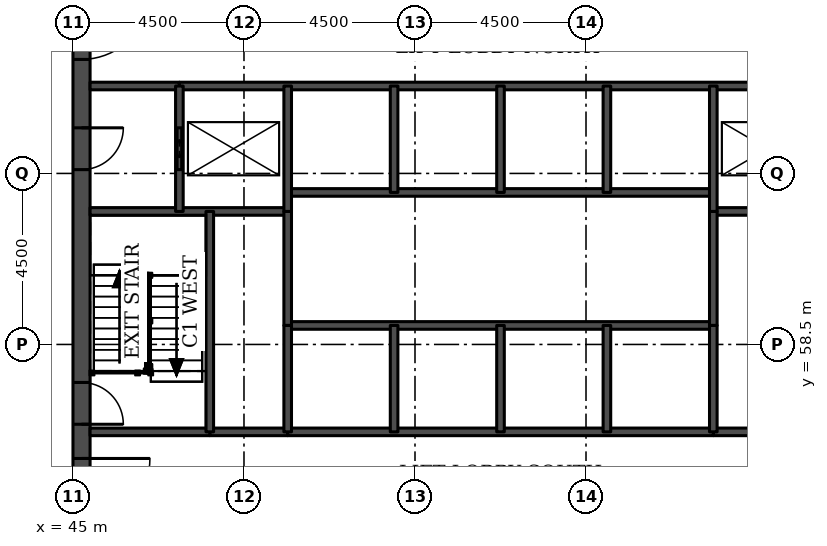
"""IFC4 building model, lengths in metres.
Left out: names, types, materials, properties, quantities, classifications, styles, units other than length and angle.
Written with IfcOpenShell. Run it as: python <this file> out.ifc"""

import sys

from ifc_helpers import new_model, si_unit, direction, frame, frame_2d, origin, place, context, subcontext, project, spatial, rectangle, extrude, element, fill, save


model = new_model("IFC4")
c1 = context("Model", 3, precision=1e-05, world=origin(), true_north=direction((0.0, 1.0)))
c2 = subcontext(c1, "Body", "Model", "MODEL_VIEW")
j1 = project(units=[si_unit("LENGTHUNIT", "METRE"), si_unit("PLANEANGLEUNIT", "RADIAN")], contexts=[c1])
p1 = place(None, origin())
s1 = spatial("IfcSite", under=j1, at=p1, CompositionType="ELEMENT")
p2 = place(p1, origin())
s2 = spatial("IfcBuilding", under=s1, at=p2, CompositionType="ELEMENT")
p3 = place(p2, frame((0.0, 0.0, 74.3)))
s3 = spatial("IfcBuildingStorey", under=s2, at=p3, CompositionType="ELEMENT", Elevation=74.3)
p4 = place(p3, frame((45.225, 49.5, 0.0), z_axis=(0.0, 0.0, 1.0), x_axis=(0.0, 1.0, 0.0)))
e1 = element("IfcWall", 1, at=p4, inside=s3, PredefinedType="SHEAR", context=c2, shape_type="SweptSolid", body=[
    extrude(rectangle(XDim=22.5, YDim=0.45, at=frame_2d((11.25, 0.0))), origin(), (0.0, 0.0, 1.0), 4.6),
])
p5 = place(p4, frame((4.2, 0.0, 0.0)))
e2 = element("IfcOpeningElement", 2, at=p5, cuts=e1, PredefinedType="OPENING", context=c2, shape_type="SweptSolid", body=[
    extrude(rectangle(XDim=1.8, YDim=2.1, at=frame_2d((0.9, 1.05))), frame((0.0, 0.235, 0.0), z_axis=(0.0, -1.0, 0.0), x_axis=(1.0, 0.0, 0.0)), (0.0, 0.0, 1.0), 0.47),
])
p6 = place(p4, frame((6.9, 0.0, 0.0)))
e3 = element("IfcOpeningElement", 3, at=p6, cuts=e1, PredefinedType="OPENING", context=c2, shape_type="SweptSolid", body=[
    extrude(rectangle(XDim=1.1, YDim=2.1, at=frame_2d((0.55, 1.05))), frame((0.0, 0.235, 0.0), z_axis=(0.0, -1.0, 0.0), x_axis=(1.0, 0.0, 0.0)), (0.0, 0.0, 1.0), 0.47),
])
p7 = place(p4, frame((13.6, 0.0, 0.0)))
e4 = element("IfcOpeningElement", 4, at=p7, cuts=e1, PredefinedType="OPENING", context=c2, shape_type="SweptSolid", body=[
    extrude(rectangle(XDim=1.1, YDim=2.1, at=frame_2d((0.55, 1.05))), frame((0.0, 0.235, 0.0), z_axis=(0.0, -1.0, 0.0), x_axis=(1.0, 0.0, 0.0)), (0.0, 0.0, 1.0), 0.47),
])
p8 = place(p4, frame((16.5, 0.0, 0.0)))
e5 = element("IfcOpeningElement", 5, at=p8, cuts=e1, PredefinedType="OPENING", context=c2, shape_type="SweptSolid", body=[
    extrude(rectangle(XDim=1.8, YDim=2.1, at=frame_2d((0.9, 1.05))), frame((0.0, 0.235, 0.0), z_axis=(0.0, -1.0, 0.0), x_axis=(1.0, 0.0, 0.0)), (0.0, 0.0, 1.0), 0.47),
])
for number, where, z_axis, x_axis in (
    (6, (48.6, 56.2, 0.0), (0.0, 0.0, 1.0), (1.0, 0.0, 0.0)),
    (7, (61.85, 56.2, 0.0), (0.0, 0.0, 1.0), (1.0, 0.0, 0.0)),
):
    element("IfcWall", number, at=place(p3, frame(where, z_axis=z_axis, x_axis=x_axis)), inside=s3, PredefinedType="SOLIDWALL", context=c2, shape_type="SweptSolid", body=[
        extrude(rectangle(XDim=2.05, YDim=0.2, at=frame_2d((1.025, 0.0))), origin(), (0.0, 0.0, 1.0), 4.45),
    ])
p9 = place(p3, frame((45.45, 56.2, 0.0), z_axis=(0.0, 0.0, 1.0), x_axis=(1.0, 0.0, 0.0)))
e8 = element("IfcWall", 8, at=p9, inside=s3, PredefinedType="SOLIDWALL", context=c2, shape_type="SweptSolid", body=[
    extrude(rectangle(XDim=3.15, YDim=0.2, at=frame_2d((1.575, 0.0))), origin(), (0.0, 0.0, 1.0), 4.45),
])
p10 = place(p3, frame((50.65, 56.2, 0.0), z_axis=(0.0, 0.0, 1.0), x_axis=(1.0, 0.0, 0.0)))
e9 = element("IfcWall", 9, at=p10, inside=s3, PredefinedType="SOLIDWALL", context=c2, shape_type="SweptSolid", body=[
    extrude(rectangle(XDim=11.2, YDim=0.2, at=frame_2d((5.6, 0.0))), origin(), (0.0, 0.0, 1.0), 4.45),
])
p11 = place(p3, frame((50.65, 59.0, 0.0), z_axis=(0.0, 0.0, 1.0), x_axis=(1.0, 0.0, 0.0)))
e10 = element("IfcWall", 10, at=p11, inside=s3, PredefinedType="SOLIDWALL", context=c2, shape_type="SweptSolid", body=[
    extrude(rectangle(XDim=11.2, YDim=0.2, at=frame_2d((5.6, 0.0))), origin(), (0.0, 0.0, 1.0), 4.6),
])
for number, where, z_axis, x_axis in (
    (11, (45.45, 62.0, 0.0), (0.0, 0.0, 1.0), (1.0, 0.0, 0.0)),
    (12, (61.85, 62.0, 0.0), (0.0, 0.0, 1.0), (1.0, 0.0, 0.0)),
):
    element("IfcWall", number, at=place(p3, frame(where, z_axis=z_axis, x_axis=x_axis)), inside=s3, PredefinedType="SOLIDWALL", context=c2, shape_type="SweptSolid", body=[
        extrude(rectangle(XDim=5.2, YDim=0.2, at=frame_2d((2.6, 0.0))), origin(), (0.0, 0.0, 1.0), 4.45),
    ])
p12 = place(p3, frame((50.65, 62.5, 0.0), z_axis=(0.0, 0.0, 1.0), x_axis=(1.0, 0.0, 0.0)))
e13 = element("IfcWall", 13, at=p12, inside=s3, PredefinedType="SOLIDWALL", context=c2, shape_type="SweptSolid", body=[
    extrude(rectangle(XDim=11.2, YDim=0.2, at=frame_2d((5.6, 0.0))), origin(), (0.0, 0.0, 1.0), 4.6),
])
p13 = place(p3, frame((45.45, 65.3, 0.0), z_axis=(0.0, 0.0, 1.0), x_axis=(1.0, 0.0, 0.0)))
e14 = element("IfcWall", 14, at=p13, inside=s3, PredefinedType="SOLIDWALL", context=c2, shape_type="SweptSolid", body=[
    extrude(rectangle(XDim=2.35, YDim=0.2, at=frame_2d((1.175, 0.0))), origin(), (0.0, 0.0, 1.0), 4.45),
])
p14 = place(p3, frame((47.8, 65.3, 0.0), z_axis=(0.0, 0.0, 1.0), x_axis=(1.0, 0.0, 0.0)))
e15 = element("IfcWall", 15, at=p14, inside=s3, PredefinedType="SOLIDWALL", context=c2, shape_type="SweptSolid", body=[
    extrude(rectangle(XDim=16.9, YDim=0.2, at=frame_2d((8.45, 0.0))), origin(), (0.0, 0.0, 1.0), 4.45),
])
p15 = place(p3, frame((47.8, 62.0, 0.0), z_axis=(0.0, 0.0, 1.0), x_axis=(0.0, 1.0, 0.0)))
e16 = element("IfcWall", 16, at=p15, inside=s3, PredefinedType="SOLIDWALL", context=c2, shape_type="SweptSolid", body=[
    extrude(rectangle(XDim=3.3, YDim=0.2, at=frame_2d((1.65, 0.0))), origin(), (0.0, 0.0, 1.0), 4.45),
])
p16 = place(p15, frame((1.1, 0.0, 0.0)))
e17 = element("IfcOpeningElement", 17, at=p16, cuts=e16, PredefinedType="OPENING", context=c2, shape_type="SweptSolid", body=[
    extrude(rectangle(XDim=1.1, YDim=2.1, at=frame_2d((0.55, 1.05))), frame((0.0, 0.11, 0.0), z_axis=(0.0, -1.0, 0.0), x_axis=(1.0, 0.0, 0.0)), (0.0, 0.0, 1.0), 0.22),
])
p17 = place(p3, frame((48.6, 56.2, 0.0), z_axis=(0.0, 0.0, 1.0), x_axis=(0.0, 1.0, 0.0)))
e18 = element("IfcWall", 18, at=p17, inside=s3, PredefinedType="SOLIDWALL", context=c2, shape_type="SweptSolid", body=[
    extrude(rectangle(XDim=5.8, YDim=0.2, at=frame_2d((2.9, 0.0))), origin(), (0.0, 0.0, 1.0), 4.45),
])
p18 = place(p3, frame((50.65, 59.0, 0.0), z_axis=(0.0, 0.0, 1.0), x_axis=(0.0, 1.0, 0.0)))
e19 = element("IfcWall", 19, at=p18, inside=s3, PredefinedType="SOLIDWALL", context=c2, shape_type="SweptSolid", body=[
    extrude(rectangle(XDim=3.0, YDim=0.2, at=frame_2d((1.5, 0.0))), origin(), (0.0, 0.0, 1.0), 4.6),
])
p19 = place(p3, frame((50.65, 56.2, 0.0), z_axis=(0.0, 0.0, 1.0), x_axis=(0.0, 1.0, 0.0)))
e20 = element("IfcWall", 20, at=p19, inside=s3, PredefinedType="SOLIDWALL", context=c2, shape_type="SweptSolid", body=[
    extrude(rectangle(XDim=2.8, YDim=0.2, at=frame_2d((1.4, 0.0))), origin(), (0.0, 0.0, 1.0), 4.45),
])
p20 = place(p3, frame((50.65, 62.0, 0.0), z_axis=(0.0, 0.0, 1.0), x_axis=(0.0, 1.0, 0.0)))
e21 = element("IfcWall", 21, at=p20, inside=s3, PredefinedType="SOLIDWALL", context=c2, shape_type="SweptSolid", body=[
    extrude(rectangle(XDim=3.3, YDim=0.2, at=frame_2d((1.65, 0.0))), origin(), (0.0, 0.0, 1.0), 4.45),
])
for number, where, z_axis, x_axis in (
    (22, (53.45, 56.2, 0.0), (0.0, 0.0, 1.0), (0.0, 1.0, 0.0)),
    (23, (53.45, 62.5, 0.0), (0.0, 0.0, 1.0), (0.0, 1.0, 0.0)),
    (24, (56.25, 56.2, 0.0), (0.0, 0.0, 1.0), (0.0, 1.0, 0.0)),
    (25, (56.25, 62.5, 0.0), (0.0, 0.0, 1.0), (0.0, 1.0, 0.0)),
    (26, (59.05, 56.2, 0.0), (0.0, 0.0, 1.0), (0.0, 1.0, 0.0)),
    (27, (59.05, 62.5, 0.0), (0.0, 0.0, 1.0), (0.0, 1.0, 0.0)),
):
    element("IfcWall", number, at=place(p3, frame(where, z_axis=z_axis, x_axis=x_axis)), inside=s3, PredefinedType="SOLIDWALL", context=c2, shape_type="SweptSolid", body=[
        extrude(rectangle(XDim=2.8, YDim=0.2, at=frame_2d((1.4, 0.0))), origin(), (0.0, 0.0, 1.0), 4.45),
    ])
p21 = place(p3, frame((61.85, 59.0, 0.0), z_axis=(0.0, 0.0, 1.0), x_axis=(0.0, 1.0, 0.0)))
e28 = element("IfcWall", 28, at=p21, inside=s3, PredefinedType="SOLIDWALL", context=c2, shape_type="SweptSolid", body=[
    extrude(rectangle(XDim=3.0, YDim=0.2, at=frame_2d((1.5, 0.0))), origin(), (0.0, 0.0, 1.0), 4.6),
])
p22 = place(p3, frame((61.85, 56.2, 0.0), z_axis=(0.0, 0.0, 1.0), x_axis=(0.0, 1.0, 0.0)))
e29 = element("IfcWall", 29, at=p22, inside=s3, PredefinedType="SOLIDWALL", context=c2, shape_type="SweptSolid", body=[
    extrude(rectangle(XDim=2.8, YDim=0.2, at=frame_2d((1.4, 0.0))), origin(), (0.0, 0.0, 1.0), 4.45),
])
p23 = place(p3, frame((61.85, 62.0, 0.0), z_axis=(0.0, 0.0, 1.0), x_axis=(0.0, 1.0, 0.0)))
e30 = element("IfcWall", 30, at=p23, inside=s3, PredefinedType="SOLIDWALL", context=c2, shape_type="SweptSolid", body=[
    extrude(rectangle(XDim=3.3, YDim=0.2, at=frame_2d((1.65, 0.0))), origin(), (0.0, 0.0, 1.0), 4.45),
])
p24 = place(p16, origin())
e31 = element("IfcDoor", 31, at=p24, inside=s3, OperationType="DOUBLE_DOOR_SLIDING", PredefinedType="DOOR", context=c2, shape_type="SweptSolid", body=[
    extrude(rectangle(XDim=1.1, YDim=2.1, at=frame_2d((0.55, 1.05))), frame((0.0, 0.025, 0.0), z_axis=(0.0, -1.0, 0.0), x_axis=(1.0, 0.0, 0.0)), (0.0, 0.0, 1.0), 0.05),
])
fill(e17, e31)
p25 = place(p5, frame((1.8, 0.0, 0.0), z_axis=(0.0, 0.0, 1.0), x_axis=(-1.0, 0.0, 0.0)))
e32 = element("IfcDoor", 32, at=p25, inside=s3, OperationType="SINGLE_SWING_LEFT", PredefinedType="DOOR", context=c2, shape_type="SweptSolid", body=[
    extrude(rectangle(XDim=1.8, YDim=2.1, at=frame_2d((0.9, 1.05))), frame((0.0, 0.025, 0.0), z_axis=(0.0, -1.0, 0.0), x_axis=(1.0, 0.0, 0.0)), (0.0, 0.0, 1.0), 0.05),
])
fill(e2, e32)
p26 = place(p6, frame((1.1, 0.0, 0.0), z_axis=(0.0, 0.0, 1.0), x_axis=(-1.0, 0.0, 0.0)))
e33 = element("IfcDoor", 33, at=p26, inside=s3, OperationType="SINGLE_SWING_RIGHT", PredefinedType="DOOR", context=c2, shape_type="SweptSolid", body=[
    extrude(rectangle(XDim=1.1, YDim=2.1, at=frame_2d((0.55, 1.05))), frame((0.0, 0.025, 0.0), z_axis=(0.0, -1.0, 0.0), x_axis=(1.0, 0.0, 0.0)), (0.0, 0.0, 1.0), 0.05),
])
fill(e3, e33)
p27 = place(p7, frame((1.1, 0.0, 0.0), z_axis=(0.0, 0.0, 1.0), x_axis=(-1.0, 0.0, 0.0)))
e34 = element("IfcDoor", 34, at=p27, inside=s3, OperationType="SINGLE_SWING_LEFT", PredefinedType="DOOR", context=c2, shape_type="SweptSolid", body=[
    extrude(rectangle(XDim=1.1, YDim=2.1, at=frame_2d((0.55, 1.05))), frame((0.0, 0.025, 0.0), z_axis=(0.0, -1.0, 0.0), x_axis=(1.0, 0.0, 0.0)), (0.0, 0.0, 1.0), 0.05),
])
fill(e4, e34)
p28 = place(p8, frame((1.8, 0.0, 0.0), z_axis=(0.0, 0.0, 1.0), x_axis=(-1.0, 0.0, 0.0)))
e35 = element("IfcDoor", 35, at=p28, inside=s3, OperationType="SINGLE_SWING_LEFT", PredefinedType="DOOR", context=c2, shape_type="SweptSolid", body=[
    extrude(rectangle(XDim=1.8, YDim=2.1, at=frame_2d((0.9, 1.05))), frame((0.0, 0.025, 0.0), z_axis=(0.0, -1.0, 0.0), x_axis=(1.0, 0.0, 0.0)), (0.0, 0.0, 1.0), 0.05),
])
fill(e5, e35)
save(model, sys.argv[1])
